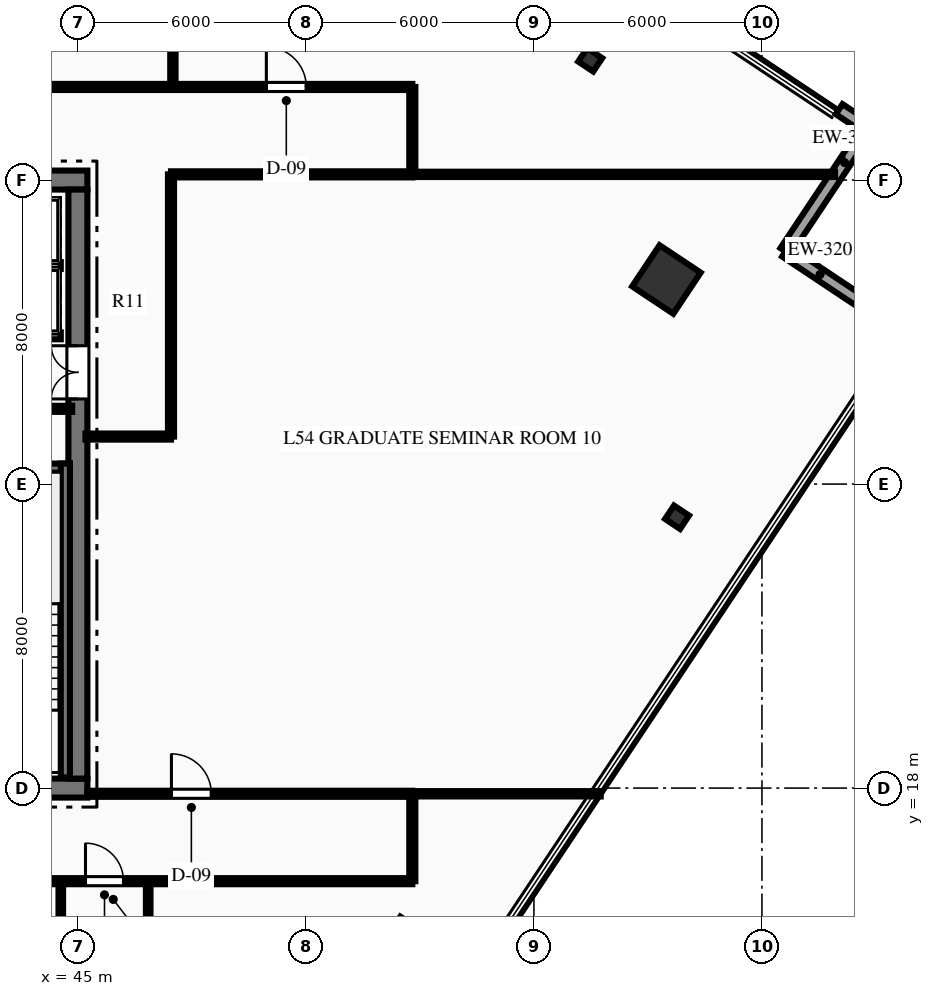
"""IFC4 building model, lengths in metres.
Left out: names, types, materials, properties, quantities, classifications, styles, units other than length and angle.
Written with IfcOpenShell. Run it as: python <this file> out.ifc"""

import sys

from ifc_helpers import new_model, si_unit, direction, frame, frame_2d, origin, origin_2d, place, context, subcontext, project, spatial, rectangle, hollow_rectangle, i_section, extrude, element, fill, save


model = new_model("IFC4")
c1 = context("Model", 3, precision=1e-05, world=origin(), true_north=direction((0.0, 1.0)))
c2 = subcontext(c1, "Body", "Model", "MODEL_VIEW")
j1 = project(units=[si_unit("LENGTHUNIT", "METRE"), si_unit("PLANEANGLEUNIT", "RADIAN")], contexts=[c1])
p1 = place(None, origin())
s1 = spatial("IfcSite", under=j1, at=p1, CompositionType="ELEMENT")
p2 = place(p1, origin())
s2 = spatial("IfcBuilding", under=s1, at=p2, CompositionType="ELEMENT")
p3 = place(p2, frame((0.0, 0.0, 217.2)))
s3 = spatial("IfcBuildingStorey", under=s2, at=p3, CompositionType="ELEMENT", Elevation=217.2)
p4 = place(p3, frame((26.75, 18.0, 0.0), z_axis=(0.0, 0.0, 1.0), x_axis=(1.0, 0.0, 0.0)))
e1 = element("IfcWall", 1, at=p4, inside=s3, PredefinedType="SHEAR", context=c2, shape_type="SweptSolid", body=[
    extrude(rectangle(XDim=18.5, YDim=0.5, at=frame_2d((9.25, 0.0))), origin(), (0.0, 0.0, 1.0), 3.75),
])
p5 = place(p4, frame((7.35, 0.0, 0.0)))
e2 = element("IfcOpeningElement", 2, at=p5, cuts=e1, PredefinedType="OPENING", context=c2, shape_type="SweptSolid", body=[
    extrude(rectangle(XDim=1.1, YDim=2.15, at=frame_2d((0.55, 1.075))), frame((0.0, 0.26, 0.0), z_axis=(0.0, -1.0, 0.0), x_axis=(1.0, 0.0, 0.0)), (0.0, 0.0, 1.0), 0.52),
])
p6 = place(p4, frame((10.05, 0.0, 0.0)))
e3 = element("IfcOpeningElement", 3, at=p6, cuts=e1, PredefinedType="OPENING", context=c2, shape_type="SweptSolid", body=[
    extrude(rectangle(XDim=1.1, YDim=2.15, at=frame_2d((0.55, 1.075))), frame((0.0, 0.26, 0.0), z_axis=(0.0, -1.0, 0.0), x_axis=(1.0, 0.0, 0.0)), (0.0, 0.0, 1.0), 0.52),
])
p7 = place(p3, frame((26.75, 34.0, 0.0), z_axis=(0.0, 0.0, 1.0), x_axis=(1.0, 0.0, 0.0)))
e4 = element("IfcWall", 4, at=p7, inside=s3, PredefinedType="SHEAR", context=c2, shape_type="SweptSolid", body=[
    extrude(rectangle(XDim=18.5, YDim=0.5, at=frame_2d((9.25, 0.0))), origin(), (0.0, 0.0, 1.0), 3.75),
])
p8 = place(p7, frame((13.935, 0.0, 0.0)))
e5 = element("IfcOpeningElement", 5, at=p8, cuts=e4, PredefinedType="OPENING", context=c2, shape_type="SweptSolid", body=[
    extrude(rectangle(XDim=1.1, YDim=2.15, at=frame_2d((0.55, 1.075))), frame((0.0, 0.26, 0.0), z_axis=(0.0, -1.0, 0.0), x_axis=(1.0, 0.0, 0.0)), (0.0, 0.0, 1.0), 0.52),
])
p9 = place(p7, frame((16.185, 0.0, 0.0)))
e6 = element("IfcOpeningElement", 6, at=p9, cuts=e4, PredefinedType="OPENING", context=c2, shape_type="SweptSolid", body=[
    extrude(rectangle(XDim=1.1, YDim=2.15, at=frame_2d((0.55, 1.075))), frame((0.0, 0.26, 0.0), z_axis=(0.0, -1.0, 0.0), x_axis=(1.0, 0.0, 0.0)), (0.0, 0.0, 1.0), 0.52),
])
p10 = place(p3, frame((45.0, 18.25, 0.0), z_axis=(0.0, 0.0, 1.0), x_axis=(0.0, 1.0, 0.0)))
e7 = element("IfcWall", 7, at=p10, inside=s3, PredefinedType="SHEAR", context=c2, shape_type="SweptSolid", body=[
    extrude(rectangle(XDim=15.5, YDim=0.5, at=frame_2d((7.75, 0.0))), origin(), (0.0, 0.0, 1.0), 3.75),
])
p11 = place(p10, frame((9.99, 0.0, 0.0)))
e8 = element("IfcOpeningElement", 8, at=p11, cuts=e7, PredefinedType="OPENING", context=c2, shape_type="SweptSolid", body=[
    extrude(rectangle(XDim=1.4, YDim=2.2, at=frame_2d((0.7, 1.1))), frame((0.0, 0.26, 0.0), z_axis=(0.0, -1.0, 0.0), x_axis=(1.0, 0.0, 0.0)), (0.0, 0.0, 1.0), 0.52),
])
p12 = place(p3, frame((40.81, 26.42, 0.0), z_axis=(0.0, 0.0, 1.0), x_axis=(1.0, 0.0, 0.0)))
e9 = element("IfcWall", 9, at=p12, inside=s3, PredefinedType="SHEAR", context=c2, shape_type="SweptSolid", body=[
    extrude(rectangle(XDim=3.98, YDim=0.24, at=frame_2d((1.99, 0.0))), origin(), (0.0, 0.0, 1.0), 3.75),
])
p13 = place(p3, frame((44.67, 18.28, 0.0), z_axis=(0.0, 0.0, 1.0), x_axis=(0.0, 1.0, 0.0)))
e10 = element("IfcWall", 10, at=p13, inside=s3, PredefinedType="SHEAR", context=c2, shape_type="SweptSolid", body=[
    extrude(rectangle(XDim=8.26, YDim=0.24, at=frame_2d((4.13, 0.0))), origin(), (0.0, 0.0, 1.0), 3.75),
])
p14 = place(p3, frame((60.486, 31.384, 0.0), z_axis=(0.0, 0.0, 1.0), x_axis=(0.554118199338, 0.832437998389, 0.0)))
e11 = element("IfcColumn", 11, at=p14, inside=s3, PredefinedType="COLUMN", context=c2, shape_type="SweptSolid", body=[
    extrude(hollow_rectangle(XDim=1.3, YDim=1.3, WallThickness=0.06, at=origin_2d()), origin(), (0.0, 0.0, 1.0), 3.75),
])
for number, where, z_axis, x_axis in (
    (12, (60.766, 25.126, 0.0), (0.0, 0.0, 1.0), (0.554, 0.832, 0.0)),
    (13, (58.481, 37.164, 0.0), (0.0, 0.0, 1.0), (0.554, 0.832, 0.0)),
):
    element("IfcColumn", number, at=place(p3, frame(where, z_axis=z_axis, x_axis=x_axis)), inside=s3, PredefinedType="COLUMN", context=c2, shape_type="SweptSolid", body=[
        extrude(i_section(OverallWidth=0.424, OverallDepth=0.474, WebThickness=0.048, FlangeThickness=0.077, at=origin_2d()), origin(), (0.0, 0.0, 1.0), 3.75),
    ])
for number, where, z_axis, x_axis in (
    (14, (63.62, 32.121, 0.0), (0.0, 0.0, 1.0), (0.832, -0.554, 0.0)),
    (15, (65.781, 35.367, 0.0), (0.0, 0.0, 1.0), (-0.554, -0.832, 0.0)),
):
    element("IfcWall", number, at=place(p3, frame(where, z_axis=z_axis, x_axis=x_axis)), inside=s3, PredefinedType="STANDARD", context=c2, shape_type="SweptSolid", body=[
        extrude(rectangle(XDim=3.9, YDim=0.32, at=frame_2d((1.95, 0.0))), origin(), (0.0, 0.0, 1.0), 3.47),
    ])
p15 = place(p3, frame((65.032, 35.866, 0.0), z_axis=(0.0, 0.0, 1.0), x_axis=(0.832425662246, -0.554136731172, 0.0)))
e16 = element("IfcWall", 16, at=p15, inside=s3, PredefinedType="STANDARD", context=c2, shape_type="SweptSolid", body=[
    extrude(rectangle(XDim=0.9, YDim=0.32, at=frame_2d((0.45, 0.0))), origin(), (0.0, 0.0, 1.0), 3.47),
])
p16 = place(p3, frame((40.8, 27.98, 0.0), z_axis=(0.0, 0.0, 1.0), x_axis=(1.0, 0.0, 0.0)))
e17 = element("IfcWall", 17, at=p16, inside=s3, PredefinedType="PARTITIONING", context=c2, shape_type="SweptSolid", body=[
    extrude(rectangle(XDim=4.05, YDim=0.16, at=frame_2d((2.025, 0.0))), origin(), (0.0, 0.0, 1.0), 3.47),
])
p17 = place(p16, frame((0.407, 0.0, 0.0)))
e18 = element("IfcOpeningElement", 18, at=p17, cuts=e17, PredefinedType="OPENING", context=c2, shape_type="SweptSolid", body=[
    extrude(rectangle(XDim=0.9, YDim=2.15, at=frame_2d((0.45, 1.075))), frame((0.0, 0.09, 0.0), z_axis=(0.0, -1.0, 0.0), x_axis=(1.0, 0.0, 0.0)), (0.0, 0.0, 1.0), 0.18),
])
p18 = place(p16, frame((2.2, 0.0, 0.0)))
e19 = element("IfcOpeningElement", 19, at=p18, cuts=e17, PredefinedType="OPENING", context=c2, shape_type="SweptSolid", body=[
    extrude(rectangle(XDim=0.9, YDim=2.15, at=frame_2d((0.45, 1.075))), frame((0.0, 0.09, 0.0), z_axis=(0.0, -1.0, 0.0), x_axis=(1.0, 0.0, 0.0)), (0.0, 0.0, 1.0), 0.18),
])
p19 = place(p3, frame((40.12, 29.9, 0.0), z_axis=(0.0, 0.0, 1.0), x_axis=(1.0, 0.0, 0.0)))
e20 = element("IfcWall", 20, at=p19, inside=s3, PredefinedType="PARTITIONING", context=c2, shape_type="SweptSolid", body=[
    extrude(rectangle(XDim=4.43, YDim=0.18, at=frame_2d((2.215, 0.0))), origin(), (0.0, 0.0, 1.0), 3.47),
])
p20 = place(p19, frame((0.565, 0.0, 0.0)))
e21 = element("IfcOpeningElement", 21, at=p20, cuts=e20, PredefinedType="OPENING", context=c2, shape_type="SweptSolid", body=[
    extrude(rectangle(XDim=1.1, YDim=2.15, at=frame_2d((0.55, 1.075))), frame((0.0, 0.1, 0.0), z_axis=(0.0, -1.0, 0.0), x_axis=(1.0, 0.0, 0.0)), (0.0, 0.0, 1.0), 0.2),
])
p21 = place(p19, frame((2.815, 0.0, 0.0)))
e22 = element("IfcOpeningElement", 22, at=p21, cuts=e20, PredefinedType="OPENING", context=c2, shape_type="SweptSolid", body=[
    extrude(rectangle(XDim=1.1, YDim=2.15, at=frame_2d((0.55, 1.075))), frame((0.0, 0.1, 0.0), z_axis=(0.0, -1.0, 0.0), x_axis=(1.0, 0.0, 0.0)), (0.0, 0.0, 1.0), 0.2),
])
p22 = place(p3, frame((40.12, 31.75, 0.0), z_axis=(0.0, 0.0, 1.0), x_axis=(1.0, 0.0, 0.0)))
e23 = element("IfcWall", 23, at=p22, inside=s3, PredefinedType="PARTITIONING", context=c2, shape_type="SweptSolid", body=[
    extrude(rectangle(XDim=4.43, YDim=0.18, at=frame_2d((2.215, 0.0))), origin(), (0.0, 0.0, 1.0), 3.47),
])
p23 = place(p3, frame((18.2, 15.55, 0.0), z_axis=(0.0, 0.0, 1.0), x_axis=(1.0, 0.0, 0.0)))
e24 = element("IfcWall", 24, at=p23, inside=s3, PredefinedType="PARTITIONING", context=c2, shape_type="SweptSolid", body=[
    extrude(rectangle(XDim=35.6, YDim=0.16, at=frame_2d((17.8, 0.0))), origin(), (0.0, 0.0, 1.0), 2.849),
])
p24 = place(p23, frame((22.45, 0.0, 0.0)))
e25 = element("IfcOpeningElement", 25, at=p24, cuts=e24, PredefinedType="OPENING", context=c2, shape_type="SweptSolid", body=[
    extrude(rectangle(XDim=0.9, YDim=2.15, at=frame_2d((0.45, 1.075))), frame((0.0, 0.09, 0.0), z_axis=(0.0, -1.0, 0.0), x_axis=(1.0, 0.0, 0.0)), (0.0, 0.0, 1.0), 0.18),
])
p25 = place(p23, frame((24.75, 0.0, 0.0)))
e26 = element("IfcOpeningElement", 26, at=p25, cuts=e24, PredefinedType="OPENING", context=c2, shape_type="SweptSolid", body=[
    extrude(rectangle(XDim=0.9, YDim=2.15, at=frame_2d((0.45, 1.075))), frame((0.0, 0.09, 0.0), z_axis=(0.0, -1.0, 0.0), x_axis=(1.0, 0.0, 0.0)), (0.0, 0.0, 1.0), 0.18),
])
p26 = place(p23, frame((27.0, 0.0, 0.0)))
e27 = element("IfcOpeningElement", 27, at=p26, cuts=e24, PredefinedType="OPENING", context=c2, shape_type="SweptSolid", body=[
    extrude(rectangle(XDim=1.0, YDim=2.15, at=frame_2d((0.5, 1.075))), frame((0.0, 0.09, 0.0), z_axis=(0.0, -1.0, 0.0), x_axis=(1.0, 0.0, 0.0)), (0.0, 0.0, 1.0), 0.18),
])
p27 = place(p23, frame((1.945, 0.0, 0.0)))
e28 = element("IfcOpeningElement", 28, at=p27, cuts=e24, PredefinedType="OPENING", context=c2, shape_type="SweptSolid", body=[
    extrude(rectangle(XDim=1.05, YDim=2.15, at=frame_2d((0.525, 1.075))), frame((0.0, 0.09, 0.0), z_axis=(0.0, -1.0, 0.0), x_axis=(1.0, 0.0, 0.0)), (0.0, 0.0, 1.0), 0.18),
])
p28 = place(p23, frame((7.995, 0.0, 0.0)))
e29 = element("IfcOpeningElement", 29, at=p28, cuts=e24, PredefinedType="OPENING", context=c2, shape_type="SweptSolid", body=[
    extrude(rectangle(XDim=1.05, YDim=2.15, at=frame_2d((0.525, 1.075))), frame((0.0, 0.09, 0.0), z_axis=(0.0, -1.0, 0.0), x_axis=(1.0, 0.0, 0.0)), (0.0, 0.0, 1.0), 0.18),
])
p29 = place(p23, frame((17.827, 0.0, 0.0)))
e30 = element("IfcOpeningElement", 30, at=p29, cuts=e24, PredefinedType="OPENING", context=c2, shape_type="SweptSolid", body=[
    extrude(rectangle(XDim=1.05, YDim=2.15, at=frame_2d((0.525, 1.075))), frame((0.0, 0.09, 0.0), z_axis=(0.0, -1.0, 0.0), x_axis=(1.0, 0.0, 0.0)), (0.0, 0.0, 1.0), 0.18),
])
p30 = place(p3, frame((45.25, 17.85, 0.0), z_axis=(0.0, 0.0, 1.0), x_axis=(1.0, 0.0, 0.0)))
e31 = element("IfcWall", 31, at=p30, inside=s3, PredefinedType="PARTITIONING", context=c2, shape_type="SweptSolid", body=[
    extrude(rectangle(XDim=8.55, YDim=0.16, at=frame_2d((4.275, 0.0))), origin(), (0.0, 0.0, 1.0), 3.47),
])
p31 = place(p30, frame((2.211, 0.0, 0.0)))
e32 = element("IfcOpeningElement", 32, at=p31, cuts=e31, PredefinedType="OPENING", context=c2, shape_type="SweptSolid", body=[
    extrude(rectangle(XDim=1.05, YDim=2.15, at=frame_2d((0.525, 1.075))), frame((0.0, 0.09, 0.0), z_axis=(0.0, -1.0, 0.0), x_axis=(1.0, 0.0, 0.0)), (0.0, 0.0, 1.0), 0.18),
])
p32 = place(p3, frame((18.2, 36.45, 0.0), z_axis=(0.0, 0.0, 1.0), x_axis=(1.0, 0.0, 0.0)))
e33 = element("IfcWall", 33, at=p32, inside=s3, PredefinedType="PARTITIONING", context=c2, shape_type="SweptSolid", body=[
    extrude(rectangle(XDim=35.6, YDim=0.16, at=frame_2d((17.8, 0.0))), origin(), (0.0, 0.0, 1.0), 2.849),
])
p33 = place(p32, frame((2.625, 0.0, 0.0)))
e34 = element("IfcOpeningElement", 34, at=p33, cuts=e33, PredefinedType="OPENING", context=c2, shape_type="SweptSolid", body=[
    extrude(rectangle(XDim=1.05, YDim=2.15, at=frame_2d((0.525, 1.075))), frame((0.0, 0.09, 0.0), z_axis=(0.0, -1.0, 0.0), x_axis=(1.0, 0.0, 0.0)), (0.0, 0.0, 1.0), 0.18),
])
p34 = place(p32, frame((9.335, 0.0, 0.0)))
e35 = element("IfcOpeningElement", 35, at=p34, cuts=e33, PredefinedType="OPENING", context=c2, shape_type="SweptSolid", body=[
    extrude(rectangle(XDim=1.05, YDim=2.15, at=frame_2d((0.525, 1.075))), frame((0.0, 0.09, 0.0), z_axis=(0.0, -1.0, 0.0), x_axis=(1.0, 0.0, 0.0)), (0.0, 0.0, 1.0), 0.18),
])
p35 = place(p32, frame((17.125, 0.0, 0.0)))
e36 = element("IfcOpeningElement", 36, at=p35, cuts=e33, PredefinedType="OPENING", context=c2, shape_type="SweptSolid", body=[
    extrude(rectangle(XDim=1.05, YDim=2.15, at=frame_2d((0.525, 1.075))), frame((0.0, 0.09, 0.0), z_axis=(0.0, -1.0, 0.0), x_axis=(1.0, 0.0, 0.0)), (0.0, 0.0, 1.0), 0.18),
])
p36 = place(p32, frame((22.875, 0.0, 0.0)))
e37 = element("IfcOpeningElement", 37, at=p36, cuts=e33, PredefinedType="OPENING", context=c2, shape_type="SweptSolid", body=[
    extrude(rectangle(XDim=1.05, YDim=2.15, at=frame_2d((0.525, 1.075))), frame((0.0, 0.09, 0.0), z_axis=(0.0, -1.0, 0.0), x_axis=(1.0, 0.0, 0.0)), (0.0, 0.0, 1.0), 0.18),
])
p37 = place(p32, frame((31.759, 0.0, 0.0)))
e38 = element("IfcOpeningElement", 38, at=p37, cuts=e33, PredefinedType="OPENING", context=c2, shape_type="SweptSolid", body=[
    extrude(rectangle(XDim=1.05, YDim=2.15, at=frame_2d((0.525, 1.075))), frame((0.0, 0.09, 0.0), z_axis=(0.0, -1.0, 0.0), x_axis=(1.0, 0.0, 0.0)), (0.0, 0.0, 1.0), 0.18),
])
p38 = place(p3, frame((47.45, 34.15, 0.0), z_axis=(0.0, 0.0, 1.0), x_axis=(1.0, 0.0, 0.0)))
e39 = element("IfcWall", 39, at=p38, inside=s3, PredefinedType="PARTITIONING", context=c2, shape_type="SweptSolid", body=[
    extrude(rectangle(XDim=6.35, YDim=0.16, at=frame_2d((3.175, 0.0))), origin(), (0.0, 0.0, 1.0), 3.47),
])
p39 = place(p3, frame((47.45, 27.25, 0.0), z_axis=(0.0, 0.0, 1.0), x_axis=(0.0, 1.0, 0.0)))
e40 = element("IfcWall", 40, at=p39, inside=s3, PredefinedType="PARTITIONING", context=c2, shape_type="SweptSolid", body=[
    extrude(rectangle(XDim=6.9, YDim=0.16, at=frame_2d((3.45, 0.0))), origin(), (0.0, 0.0, 1.0), 3.47),
])
p40 = place(p3, frame((45.2, 27.25, 0.0), z_axis=(0.0, 0.0, 1.0), x_axis=(1.0, 0.0, 0.0)))
e41 = element("IfcWall", 41, at=p40, inside=s3, PredefinedType="PARTITIONING", context=c2, shape_type="SweptSolid", body=[
    extrude(rectangle(XDim=2.25, YDim=0.16, at=frame_2d((1.125, 0.0))), origin(), (0.0, 0.0, 1.0), 3.47),
])
for number, where, z_axis, x_axis in (
    (42, (53.8, 15.55, 0.0), (0.0, 0.0, 1.0), (0.0, 1.0, 0.0)),
    (43, (53.8, 34.15, 0.0), (0.0, 0.0, 1.0), (0.0, 1.0, 0.0)),
):
    element("IfcWall", number, at=place(p3, frame(where, z_axis=z_axis, x_axis=x_axis)), inside=s3, PredefinedType="PARTITIONING", context=c2, shape_type="SweptSolid", body=[
        extrude(rectangle(XDim=2.3, YDim=0.16, at=frame_2d((1.15, 0.0))), origin(), (0.0, 0.0, 1.0), 3.47),
    ])
for number, where, z_axis, x_axis in (
    (44, (44.55, 11.65, 0.0), (0.0, 0.0, 1.0), (0.0, 1.0, 0.0)),
    (45, (46.85, 11.65, 0.0), (0.0, 0.0, 1.0), (0.0, 1.0, 0.0)),
):
    element("IfcWall", number, at=place(p3, frame(where, z_axis=z_axis, x_axis=x_axis)), inside=s3, PredefinedType="PARTITIONING", context=c2, shape_type="SweptSolid", body=[
        extrude(rectangle(XDim=3.9, YDim=0.12, at=frame_2d((1.95, 0.0))), origin(), (0.0, 0.0, 1.0), 3.47),
    ])
p41 = place(p3, frame((53.8, 17.85, 0.0), z_axis=(0.0, 0.0, 1.0), x_axis=(1.0, 0.0, 0.0)))
e46 = element("IfcWall", 46, at=p41, inside=s3, PredefinedType="PARTITIONING", context=c2, shape_type="SweptSolid", body=[
    extrude(rectangle(XDim=4.957, YDim=0.14, at=frame_2d((2.479, 0.0))), origin(), (0.0, 0.0, 1.0), 3.47),
])
p42 = place(p3, frame((53.8, 34.15, 0.0), z_axis=(0.0, 0.0, 1.0), x_axis=(1.0, 0.0, 0.0)))
e47 = element("IfcWall", 47, at=p42, inside=s3, PredefinedType="PARTITIONING", context=c2, shape_type="SweptSolid", body=[
    extrude(rectangle(XDim=11.122, YDim=0.14, at=frame_2d((5.561, 0.0))), origin(), (0.0, 0.0, 1.0), 3.47),
])
p43 = place(p3, frame((47.5, 36.45, 0.0), z_axis=(0.0, 0.0, 1.0), x_axis=(0.0, 1.0, 0.0)))
e48 = element("IfcWall", 48, at=p43, inside=s3, PredefinedType="PARTITIONING", context=c2, shape_type="SweptSolid", body=[
    extrude(rectangle(XDim=11.038, YDim=0.14, at=frame_2d((5.519, 0.0))), origin(), (0.0, 0.0, 1.0), 2.849),
])
p44 = place(p11, origin())
e49 = element("IfcDoor", 49, at=p44, inside=s3, OperationType="DOUBLE_DOOR_SINGLE_SWING", PredefinedType="DOOR", context=c2, shape_type="SweptSolid", body=[
    extrude(rectangle(XDim=1.4, YDim=2.2, at=frame_2d((0.7, 1.1))), frame((0.0, 0.025, 0.0), z_axis=(0.0, -1.0, 0.0), x_axis=(1.0, 0.0, 0.0)), (0.0, 0.0, 1.0), 0.05),
])
fill(e8, e49)
p45 = place(p26, origin())
e50 = element("IfcDoor", 50, at=p45, inside=s3, OperationType="SINGLE_SWING_LEFT", PredefinedType="DOOR", context=c2, shape_type="SweptSolid", body=[
    extrude(rectangle(XDim=1.0, YDim=2.15, at=frame_2d((0.5, 1.075))), frame((0.0, 0.025, 0.0), z_axis=(0.0, -1.0, 0.0), x_axis=(1.0, 0.0, 0.0)), (0.0, 0.0, 1.0), 0.05),
])
fill(e27, e50)
p46 = place(p37, origin())
e51 = element("IfcDoor", 51, at=p46, inside=s3, OperationType="SINGLE_SWING_LEFT", PredefinedType="DOOR", context=c2, shape_type="SweptSolid", body=[
    extrude(rectangle(XDim=1.05, YDim=2.15, at=frame_2d((0.525, 1.075))), frame((0.0, 0.025, 0.0), z_axis=(0.0, -1.0, 0.0), x_axis=(1.0, 0.0, 0.0)), (0.0, 0.0, 1.0), 0.05),
])
fill(e38, e51)
p47 = place(p31, origin())
e52 = element("IfcDoor", 52, at=p47, inside=s3, OperationType="SINGLE_SWING_LEFT", PredefinedType="DOOR", context=c2, shape_type="SweptSolid", body=[
    extrude(rectangle(XDim=1.05, YDim=2.15, at=frame_2d((0.525, 1.075))), frame((0.0, 0.025, 0.0), z_axis=(0.0, -1.0, 0.0), x_axis=(1.0, 0.0, 0.0)), (0.0, 0.0, 1.0), 0.05),
])
fill(e32, e52)
save(model, sys.argv[1])
